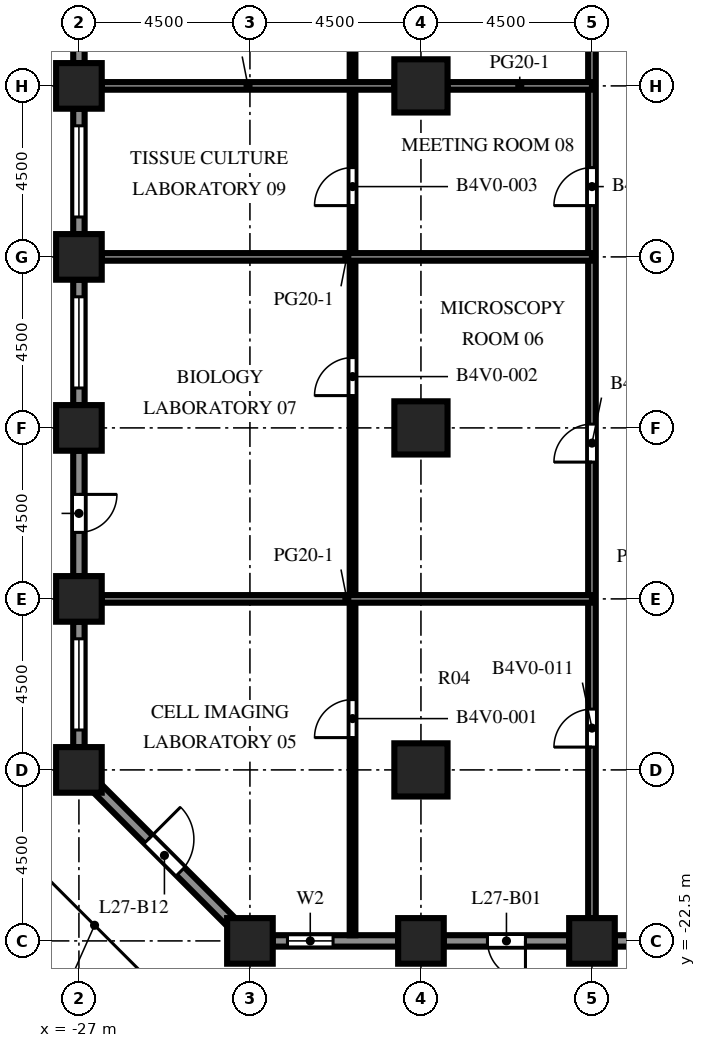
"""IFC4 building model, lengths in metres.
Left out: names, types, materials, properties, quantities, classifications, styles, units other than length and angle.
Written with IfcOpenShell. Run it as: python <this file> out.ifc"""

import sys

from ifc_helpers import new_model, si_unit, direction, frame, frame_2d, origin, origin_2d, place, context, subcontext, project, spatial, rectangle, extrude, element, fill, save


model = new_model("IFC4")
c1 = context("Model", 3, precision=1e-05, world=origin(), true_north=direction((0.0, 1.0)))
c2 = subcontext(c1, "Body", "Model", "MODEL_VIEW")
j1 = project(units=[si_unit("LENGTHUNIT", "METRE"), si_unit("PLANEANGLEUNIT", "RADIAN")], contexts=[c1])
p1 = place(None, origin())
s1 = spatial("IfcSite", under=j1, at=p1, CompositionType="ELEMENT")
p2 = place(p1, origin())
s2 = spatial("IfcBuilding", under=s1, at=p2, CompositionType="ELEMENT")
p3 = place(p2, frame((0.0, 0.0, 120.8)))
s3 = spatial("IfcBuildingStorey", under=s2, at=p3, CompositionType="ELEMENT", Elevation=120.8)
for number, where, z_axis, x_axis in (
    (1, (-27.0, -18.0, 0.0), (0.0, 0.0, 1.0), (1.0, 0.0, 0.0)),
    (2, (-27.0, -13.5, 0.0), (0.0, 0.0, 1.0), (1.0, 0.0, 0.0)),
    (3, (-27.0, -9.0, 0.0), (0.0, 0.0, 1.0), (1.0, 0.0, 0.0)),
    (4, (-27.0, -4.5, 0.0), (0.0, 0.0, 1.0), (1.0, 0.0, 0.0)),
    (5, (-27.0, 0.0, 0.0), (0.0, 0.0, 1.0), (1.0, 0.0, 0.0)),
    (6, (-22.5, -22.5, 0.0), (0.0, 0.0, 1.0), (1.0, 0.0, 0.0)),
    (7, (-18.0, -22.5, 0.0), (0.0, 0.0, 1.0), (1.0, 0.0, 0.0)),
    (8, (-13.5, -22.5, 0.0), (0.0, 0.0, 1.0), (1.0, 0.0, 0.0)),
):
    element("IfcColumn", number, at=place(p3, frame(where, z_axis=z_axis, x_axis=x_axis)), inside=s3, PredefinedType="COLUMN", context=c2, shape_type="SweptSolid", body=[
        extrude(rectangle(XDim=1.2, YDim=1.2, at=origin_2d()), origin(), (0.0, 0.0, 1.0), 4.1),
    ])
for number, where, z_axis, x_axis in (
    (9, (-18.0, -18.0, 0.0), (0.0, 0.0, 1.0), (1.0, 0.0, 0.0)),
    (10, (-18.0, -9.0, 0.0), (0.0, 0.0, 1.0), (1.0, 0.0, 0.0)),
    (11, (-18.0, 0.0, 0.0), (0.0, 0.0, 1.0), (1.0, 0.0, 0.0)),
):
    element("IfcColumn", number, at=place(p3, frame(where, z_axis=z_axis, x_axis=x_axis)), inside=s3, PredefinedType="COLUMN", context=c2, shape_type="SweptSolid", body=[
        extrude(rectangle(XDim=1.4, YDim=1.4, at=origin_2d()), origin(), (0.0, 0.0, 1.0), 4.1),
    ])
p4 = place(p3, frame((-18.6, -22.5, 0.0), z_axis=(0.0, 0.0, 1.0), x_axis=(-1.0, 0.0, 0.0)))
e12 = element("IfcWall", 12, at=p4, inside=s3, PredefinedType="SOLIDWALL", context=c2, shape_type="SweptSolid", body=[
    extrude(rectangle(XDim=3.3, YDim=0.3, at=frame_2d((1.65, 0.0))), origin(), (0.0, 0.0, 1.0), 2.75),
])
p5 = place(p4, frame((1.712, 0.0, 0.8)))
e13 = element("IfcOpeningElement", 13, at=p5, cuts=e12, PredefinedType="OPENING", context=c2, shape_type="SweptSolid", body=[
    extrude(rectangle(XDim=1.2, YDim=1.7, at=frame_2d((0.6, 0.85))), frame((0.0, 0.16, 0.0), z_axis=(0.0, -1.0, 0.0), x_axis=(1.0, 0.0, 0.0)), (0.0, 0.0, 1.0), 0.32),
])
p6 = place(p3, frame((-14.1, -22.5, 0.0), z_axis=(0.0, 0.0, 1.0), x_axis=(-1.0, 0.0, 0.0)))
e14 = element("IfcWall", 14, at=p6, inside=s3, PredefinedType="SOLIDWALL", context=c2, shape_type="SweptSolid", body=[
    extrude(rectangle(XDim=3.3, YDim=0.3, at=frame_2d((1.65, 0.0))), origin(), (0.0, 0.0, 1.0), 2.75),
])
p7 = place(p6, frame((1.15, 0.0, 0.0)))
e15 = element("IfcOpeningElement", 15, at=p7, cuts=e14, PredefinedType="OPENING", context=c2, shape_type="SweptSolid", body=[
    extrude(rectangle(XDim=1.0, YDim=2.2, at=frame_2d((0.5, 1.1))), frame((0.0, 0.16, 0.0), z_axis=(0.0, -1.0, 0.0), x_axis=(1.0, 0.0, 0.0)), (0.0, 0.0, 1.0), 0.32),
])
p8 = place(p3, frame((-9.6, -22.5, 0.0), z_axis=(0.0, 0.0, 1.0), x_axis=(-1.0, 0.0, 0.0)))
e16 = element("IfcWall", 16, at=p8, inside=s3, PredefinedType="SOLIDWALL", context=c2, shape_type="SweptSolid", body=[
    extrude(rectangle(XDim=3.3, YDim=0.3, at=frame_2d((1.65, 0.0))), origin(), (0.0, 0.0, 1.0), 2.75),
])
p9 = place(p8, frame((1.575, 0.0, 0.8)))
e17 = element("IfcOpeningElement", 17, at=p9, cuts=e16, PredefinedType="OPENING", context=c2, shape_type="SweptSolid", body=[
    extrude(rectangle(XDim=1.2, YDim=1.7, at=frame_2d((0.6, 0.85))), frame((0.0, 0.16, 0.0), z_axis=(0.0, -1.0, 0.0), x_axis=(1.0, 0.0, 0.0)), (0.0, 0.0, 1.0), 0.32),
])
p10 = place(p3, frame((-27.0, 0.6, 0.0), z_axis=(0.0, 0.0, 1.0), x_axis=(0.0, 1.0, 0.0)))
e18 = element("IfcWall", 18, at=p10, inside=s3, PredefinedType="SOLIDWALL", context=c2, shape_type="SweptSolid", body=[
    extrude(rectangle(XDim=3.3, YDim=0.3, at=frame_2d((1.65, 0.0))), origin(), (0.0, 0.0, 1.0), 2.75),
])
p11 = place(p10, frame((0.45, 0.0, 0.8)))
e19 = element("IfcOpeningElement", 19, at=p11, cuts=e18, PredefinedType="OPENING", context=c2, shape_type="SweptSolid", body=[
    extrude(rectangle(XDim=2.4, YDim=1.7, at=frame_2d((1.2, 0.85))), frame((0.0, 0.16, 0.0), z_axis=(0.0, -1.0, 0.0), x_axis=(1.0, 0.0, 0.0)), (0.0, 0.0, 1.0), 0.32),
])
p12 = place(p3, frame((-27.0, -3.9, 0.0), z_axis=(0.0, 0.0, 1.0), x_axis=(0.0, 1.0, 0.0)))
e20 = element("IfcWall", 20, at=p12, inside=s3, PredefinedType="SOLIDWALL", context=c2, shape_type="SweptSolid", body=[
    extrude(rectangle(XDim=3.3, YDim=0.3, at=frame_2d((1.65, 0.0))), origin(), (0.0, 0.0, 1.0), 2.75),
])
p13 = place(p12, frame((0.45, 0.0, 0.8)))
e21 = element("IfcOpeningElement", 21, at=p13, cuts=e20, PredefinedType="OPENING", context=c2, shape_type="SweptSolid", body=[
    extrude(rectangle(XDim=2.4, YDim=1.7, at=frame_2d((1.2, 0.85))), frame((0.0, 0.16, 0.0), z_axis=(0.0, -1.0, 0.0), x_axis=(1.0, 0.0, 0.0)), (0.0, 0.0, 1.0), 0.32),
])
p14 = place(p3, frame((-27.0, -8.4, 0.0), z_axis=(0.0, 0.0, 1.0), x_axis=(0.0, 1.0, 0.0)))
e22 = element("IfcWall", 22, at=p14, inside=s3, PredefinedType="SOLIDWALL", context=c2, shape_type="SweptSolid", body=[
    extrude(rectangle(XDim=3.3, YDim=0.3, at=frame_2d((1.65, 0.0))), origin(), (0.0, 0.0, 1.0), 2.75),
])
p15 = place(p14, frame((0.45, 0.0, 0.8)))
e23 = element("IfcOpeningElement", 23, at=p15, cuts=e22, PredefinedType="OPENING", context=c2, shape_type="SweptSolid", body=[
    extrude(rectangle(XDim=2.4, YDim=1.7, at=frame_2d((1.2, 0.85))), frame((0.0, 0.16, 0.0), z_axis=(0.0, -1.0, 0.0), x_axis=(1.0, 0.0, 0.0)), (0.0, 0.0, 1.0), 0.32),
])
p16 = place(p3, frame((-27.0, -12.9, 0.0), z_axis=(0.0, 0.0, 1.0), x_axis=(0.0, 1.0, 0.0)))
e24 = element("IfcWall", 24, at=p16, inside=s3, PredefinedType="SOLIDWALL", context=c2, shape_type="SweptSolid", body=[
    extrude(rectangle(XDim=3.3, YDim=0.3, at=frame_2d((1.65, 0.0))), origin(), (0.0, 0.0, 1.0), 2.75),
])
p17 = place(p16, frame((1.15, 0.0, 0.0)))
e25 = element("IfcOpeningElement", 25, at=p17, cuts=e24, PredefinedType="OPENING", context=c2, shape_type="SweptSolid", body=[
    extrude(rectangle(XDim=1.0, YDim=2.2, at=frame_2d((0.5, 1.1))), frame((0.0, 0.16, 0.0), z_axis=(0.0, -1.0, 0.0), x_axis=(1.0, 0.0, 0.0)), (0.0, 0.0, 1.0), 0.32),
])
p18 = place(p3, frame((-27.0, -17.4, 0.0), z_axis=(0.0, 0.0, 1.0), x_axis=(0.0, 1.0, 0.0)))
e26 = element("IfcWall", 26, at=p18, inside=s3, PredefinedType="SOLIDWALL", context=c2, shape_type="SweptSolid", body=[
    extrude(rectangle(XDim=3.3, YDim=0.3, at=frame_2d((1.65, 0.0))), origin(), (0.0, 0.0, 1.0), 2.75),
])
p19 = place(p18, frame((0.45, 0.0, 0.8)))
e27 = element("IfcOpeningElement", 27, at=p19, cuts=e26, PredefinedType="OPENING", context=c2, shape_type="SweptSolid", body=[
    extrude(rectangle(XDim=2.4, YDim=1.7, at=frame_2d((1.2, 0.85))), frame((0.0, 0.16, 0.0), z_axis=(0.0, -1.0, 0.0), x_axis=(1.0, 0.0, 0.0)), (0.0, 0.0, 1.0), 0.32),
])
p20 = place(p3, frame((-22.994, -22.006, 0.0), z_axis=(0.0, 0.0, 1.0), x_axis=(-0.707106781187, 0.707106781187, 0.0)))
e28 = element("IfcWall", 28, at=p20, inside=s3, PredefinedType="SOLIDWALL", context=c2, shape_type="SweptSolid", body=[
    extrude(rectangle(XDim=4.967, YDim=0.3, at=frame_2d((2.483, 0.0))), origin(), (0.0, 0.0, 1.0), 2.75),
])
p21 = place(p20, frame((1.884, 0.0, 0.0)))
e29 = element("IfcOpeningElement", 29, at=p21, cuts=e28, PredefinedType="OPENING", context=c2, shape_type="SweptSolid", body=[
    extrude(rectangle(XDim=1.2, YDim=2.2, at=frame_2d((0.6, 1.1))), frame((0.0, 0.16, 0.0), z_axis=(0.0, -1.0, 0.0), x_axis=(1.0, 0.0, 0.0)), (0.0, 0.0, 1.0), 0.32),
])
p22 = place(p3, frame((-19.8, -22.35, 0.0), z_axis=(0.0, 0.0, 1.0), x_axis=(0.0, 1.0, 0.0)))
e30 = element("IfcWall", 30, at=p22, inside=s3, PredefinedType="PARTITIONING", context=c2, shape_type="SweptSolid", body=[
    extrude(rectangle(XDim=53.7, YDim=0.15, at=frame_2d((26.85, 0.0))), origin(), (0.0, 0.0, 1.0), 3.65),
])
p23 = place(p22, frame((5.2, 0.0, 0.0)))
e31 = element("IfcOpeningElement", 31, at=p23, cuts=e30, PredefinedType="OPENING", context=c2, shape_type="SweptSolid", body=[
    extrude(rectangle(XDim=1.0, YDim=2.1, at=frame_2d((0.5, 1.05))), frame((0.0, 0.085, 0.0), z_axis=(0.0, -1.0, 0.0), x_axis=(1.0, 0.0, 0.0)), (0.0, 0.0, 1.0), 0.17),
])
p24 = place(p22, frame((14.2, 0.0, 0.0)))
e32 = element("IfcOpeningElement", 32, at=p24, cuts=e30, PredefinedType="OPENING", context=c2, shape_type="SweptSolid", body=[
    extrude(rectangle(XDim=1.0, YDim=2.1, at=frame_2d((0.5, 1.05))), frame((0.0, 0.085, 0.0), z_axis=(0.0, -1.0, 0.0), x_axis=(1.0, 0.0, 0.0)), (0.0, 0.0, 1.0), 0.17),
])
p25 = place(p22, frame((19.2, 0.0, 0.0)))
e33 = element("IfcOpeningElement", 33, at=p25, cuts=e30, PredefinedType="OPENING", context=c2, shape_type="SweptSolid", body=[
    extrude(rectangle(XDim=1.0, YDim=2.1, at=frame_2d((0.5, 1.05))), frame((0.0, 0.085, 0.0), z_axis=(0.0, -1.0, 0.0), x_axis=(1.0, 0.0, 0.0)), (0.0, 0.0, 1.0), 0.17),
])
p26 = place(p22, frame((29.2, 0.0, 0.0)))
e34 = element("IfcOpeningElement", 34, at=p26, cuts=e30, PredefinedType="OPENING", context=c2, shape_type="SweptSolid", body=[
    extrude(rectangle(XDim=1.0, YDim=2.1, at=frame_2d((0.5, 1.05))), frame((0.0, 0.085, 0.0), z_axis=(0.0, -1.0, 0.0), x_axis=(1.0, 0.0, 0.0)), (0.0, 0.0, 1.0), 0.17),
])
p27 = place(p22, frame((38.45, 0.0, 0.0)))
e35 = element("IfcOpeningElement", 35, at=p27, cuts=e30, PredefinedType="OPENING", context=c2, shape_type="SweptSolid", body=[
    extrude(rectangle(XDim=1.0, YDim=2.1, at=frame_2d((0.5, 1.05))), frame((0.0, 0.085, 0.0), z_axis=(0.0, -1.0, 0.0), x_axis=(1.0, 0.0, 0.0)), (0.0, 0.0, 1.0), 0.17),
])
p28 = place(p22, frame((47.45, 0.0, 0.0)))
e36 = element("IfcOpeningElement", 36, at=p28, cuts=e30, PredefinedType="OPENING", context=c2, shape_type="SweptSolid", body=[
    extrude(rectangle(XDim=1.0, YDim=2.1, at=frame_2d((0.5, 1.05))), frame((0.0, 0.085, 0.0), z_axis=(0.0, -1.0, 0.0), x_axis=(1.0, 0.0, 0.0)), (0.0, 0.0, 1.0), 0.17),
])
p29 = place(p3, frame((-13.5, -21.9, 0.0), z_axis=(0.0, 0.0, 1.0), x_axis=(0.0, 1.0, 0.0)))
e37 = element("IfcWall", 37, at=p29, inside=s3, PredefinedType="PARTITIONING", context=c2, shape_type="SweptSolid", body=[
    extrude(rectangle(XDim=52.8, YDim=0.2, at=frame_2d((26.4, 0.0))), origin(), (0.0, 0.0, 1.0), 3.65),
])
p30 = place(p29, frame((4.5, 0.0, 0.0)))
e38 = element("IfcOpeningElement", 38, at=p30, cuts=e37, PredefinedType="OPENING", context=c2, shape_type="SweptSolid", body=[
    extrude(rectangle(XDim=1.0, YDim=2.1, at=frame_2d((0.5, 1.05))), frame((0.0, 0.11, 0.0), z_axis=(0.0, -1.0, 0.0), x_axis=(1.0, 0.0, 0.0)), (0.0, 0.0, 1.0), 0.22),
])
p31 = place(p29, frame((12.0, 0.0, 0.0)))
e39 = element("IfcOpeningElement", 39, at=p31, cuts=e37, PredefinedType="OPENING", context=c2, shape_type="SweptSolid", body=[
    extrude(rectangle(XDim=1.0, YDim=2.1, at=frame_2d((0.5, 1.05))), frame((0.0, 0.11, 0.0), z_axis=(0.0, -1.0, 0.0), x_axis=(1.0, 0.0, 0.0)), (0.0, 0.0, 1.0), 0.22),
])
p32 = place(p29, frame((18.75, 0.0, 0.0)))
e40 = element("IfcOpeningElement", 40, at=p32, cuts=e37, PredefinedType="OPENING", context=c2, shape_type="SweptSolid", body=[
    extrude(rectangle(XDim=1.0, YDim=2.1, at=frame_2d((0.5, 1.05))), frame((0.0, 0.11, 0.0), z_axis=(0.0, -1.0, 0.0), x_axis=(1.0, 0.0, 0.0)), (0.0, 0.0, 1.0), 0.22),
])
p33 = place(p29, frame((29.75, 0.0, 0.0)))
e41 = element("IfcOpeningElement", 41, at=p33, cuts=e37, PredefinedType="OPENING", context=c2, shape_type="SweptSolid", body=[
    extrude(rectangle(XDim=1.0, YDim=2.1, at=frame_2d((0.5, 1.05))), frame((0.0, 0.11, 0.0), z_axis=(0.0, -1.0, 0.0), x_axis=(1.0, 0.0, 0.0)), (0.0, 0.0, 1.0), 0.22),
])
p34 = place(p29, frame((38.0, 0.0, 0.0)))
e42 = element("IfcOpeningElement", 42, at=p34, cuts=e37, PredefinedType="OPENING", context=c2, shape_type="SweptSolid", body=[
    extrude(rectangle(XDim=1.0, YDim=2.1, at=frame_2d((0.5, 1.05))), frame((0.0, 0.11, 0.0), z_axis=(0.0, -1.0, 0.0), x_axis=(1.0, 0.0, 0.0)), (0.0, 0.0, 1.0), 0.22),
])
p35 = place(p29, frame((48.0, 0.0, 0.0)))
e43 = element("IfcOpeningElement", 43, at=p35, cuts=e37, PredefinedType="OPENING", context=c2, shape_type="SweptSolid", body=[
    extrude(rectangle(XDim=1.0, YDim=2.1, at=frame_2d((0.5, 1.05))), frame((0.0, 0.11, 0.0), z_axis=(0.0, -1.0, 0.0), x_axis=(1.0, 0.0, 0.0)), (0.0, 0.0, 1.0), 0.22),
])
for number, where, z_axis, x_axis in (
    (44, (-26.4, -13.5, 0.0), (0.0, 0.0, 1.0), (1.0, 0.0, 0.0)),
    (45, (-26.4, -4.5, 0.0), (0.0, 0.0, 1.0), (1.0, 0.0, 0.0)),
):
    element("IfcWall", number, at=place(p3, frame(where, z_axis=z_axis, x_axis=x_axis)), inside=s3, PredefinedType="PARTITIONING", context=c2, shape_type="SweptSolid", body=[
        extrude(rectangle(XDim=12.9, YDim=0.2, at=frame_2d((6.45, 0.0))), origin(), (0.0, 0.0, 1.0), 3.65),
    ])
p36 = place(p3, frame((-26.4, 0.0, 0.0), z_axis=(0.0, 0.0, 1.0), x_axis=(1.0, 0.0, 0.0)))
e46 = element("IfcWall", 46, at=p36, inside=s3, PredefinedType="PARTITIONING", context=c2, shape_type="SweptSolid", body=[
    extrude(rectangle(XDim=7.7, YDim=0.2, at=frame_2d((3.85, 0.0))), origin(), (0.0, 0.0, 1.0), 3.65),
])
p37 = place(p3, frame((-17.3, 0.0, 0.0), z_axis=(0.0, 0.0, 1.0), x_axis=(1.0, 0.0, 0.0)))
e47 = element("IfcWall", 47, at=p37, inside=s3, PredefinedType="PARTITIONING", context=c2, shape_type="SweptSolid", body=[
    extrude(rectangle(XDim=3.8, YDim=0.2, at=frame_2d((1.9, 0.0))), origin(), (0.0, 0.0, 1.0), 3.65),
])
p38 = place(p5, origin())
e48 = element("IfcWindow", 48, at=p38, inside=s3, PartitioningType="SINGLE_PANEL", PredefinedType="WINDOW", context=c2, shape_type="SweptSolid", body=[
    extrude(rectangle(XDim=1.2, YDim=1.7, at=frame_2d((0.6, 0.85))), frame((0.0, 0.03, 0.0), z_axis=(0.0, -1.0, 0.0), x_axis=(1.0, 0.0, 0.0)), (0.0, 0.0, 1.0), 0.06),
])
fill(e13, e48)
p39 = place(p7, origin())
e49 = element("IfcDoor", 49, at=p39, inside=s3, OperationType="SINGLE_SWING_LEFT", PredefinedType="DOOR", context=c2, shape_type="SweptSolid", body=[
    extrude(rectangle(XDim=1.0, YDim=2.2, at=frame_2d((0.5, 1.1))), frame((0.0, 0.025, 0.0), z_axis=(0.0, -1.0, 0.0), x_axis=(1.0, 0.0, 0.0)), (0.0, 0.0, 1.0), 0.05),
])
fill(e15, e49)
p40 = place(p13, origin())
e50 = element("IfcWindow", 50, at=p40, inside=s3, PartitioningType="SINGLE_PANEL", PredefinedType="WINDOW", context=c2, shape_type="SweptSolid", body=[
    extrude(rectangle(XDim=2.4, YDim=1.7, at=frame_2d((1.2, 0.85))), frame((0.0, 0.03, 0.0), z_axis=(0.0, -1.0, 0.0), x_axis=(1.0, 0.0, 0.0)), (0.0, 0.0, 1.0), 0.06),
])
fill(e21, e50)
p41 = place(p15, origin())
e51 = element("IfcWindow", 51, at=p41, inside=s3, PartitioningType="SINGLE_PANEL", PredefinedType="WINDOW", context=c2, shape_type="SweptSolid", body=[
    extrude(rectangle(XDim=2.4, YDim=1.7, at=frame_2d((1.2, 0.85))), frame((0.0, 0.03, 0.0), z_axis=(0.0, -1.0, 0.0), x_axis=(1.0, 0.0, 0.0)), (0.0, 0.0, 1.0), 0.06),
])
fill(e23, e51)
p42 = place(p17, origin())
e52 = element("IfcDoor", 52, at=p42, inside=s3, OperationType="SINGLE_SWING_RIGHT", PredefinedType="DOOR", context=c2, shape_type="SweptSolid", body=[
    extrude(rectangle(XDim=1.0, YDim=2.2, at=frame_2d((0.5, 1.1))), frame((0.0, 0.025, 0.0), z_axis=(0.0, -1.0, 0.0), x_axis=(1.0, 0.0, 0.0)), (0.0, 0.0, 1.0), 0.05),
])
fill(e25, e52)
p43 = place(p19, origin())
e53 = element("IfcWindow", 53, at=p43, inside=s3, PartitioningType="SINGLE_PANEL", PredefinedType="WINDOW", context=c2, shape_type="SweptSolid", body=[
    extrude(rectangle(XDim=2.4, YDim=1.7, at=frame_2d((1.2, 0.85))), frame((0.0, 0.03, 0.0), z_axis=(0.0, -1.0, 0.0), x_axis=(1.0, 0.0, 0.0)), (0.0, 0.0, 1.0), 0.06),
])
fill(e27, e53)
p44 = place(p21, origin())
e54 = element("IfcDoor", 54, at=p44, inside=s3, OperationType="SINGLE_SWING_RIGHT", PredefinedType="DOOR", context=c2, shape_type="SweptSolid", body=[
    extrude(rectangle(XDim=1.2, YDim=2.2, at=frame_2d((0.6, 1.1))), frame((0.0, 0.025, 0.0), z_axis=(0.0, -1.0, 0.0), x_axis=(1.0, 0.0, 0.0)), (0.0, 0.0, 1.0), 0.05),
])
fill(e29, e54)
p45 = place(p23, origin())
e55 = element("IfcDoor", 55, at=p45, inside=s3, OperationType="SINGLE_SWING_LEFT", PredefinedType="DOOR", context=c2, shape_type="SweptSolid", body=[
    extrude(rectangle(XDim=1.0, YDim=2.1, at=frame_2d((0.5, 1.05))), frame((0.0, 0.025, 0.0), z_axis=(0.0, -1.0, 0.0), x_axis=(1.0, 0.0, 0.0)), (0.0, 0.0, 1.0), 0.05),
])
fill(e31, e55)
p46 = place(p24, origin())
e56 = element("IfcDoor", 56, at=p46, inside=s3, OperationType="SINGLE_SWING_LEFT", PredefinedType="DOOR", context=c2, shape_type="SweptSolid", body=[
    extrude(rectangle(XDim=1.0, YDim=2.1, at=frame_2d((0.5, 1.05))), frame((0.0, 0.025, 0.0), z_axis=(0.0, -1.0, 0.0), x_axis=(1.0, 0.0, 0.0)), (0.0, 0.0, 1.0), 0.05),
])
fill(e32, e56)
p47 = place(p25, origin())
e57 = element("IfcDoor", 57, at=p47, inside=s3, OperationType="SINGLE_SWING_LEFT", PredefinedType="DOOR", context=c2, shape_type="SweptSolid", body=[
    extrude(rectangle(XDim=1.0, YDim=2.1, at=frame_2d((0.5, 1.05))), frame((0.0, 0.025, 0.0), z_axis=(0.0, -1.0, 0.0), x_axis=(1.0, 0.0, 0.0)), (0.0, 0.0, 1.0), 0.05),
])
fill(e33, e57)
p48 = place(p30, origin())
e58 = element("IfcDoor", 58, at=p48, inside=s3, OperationType="SINGLE_SWING_LEFT", PredefinedType="DOOR", context=c2, shape_type="SweptSolid", body=[
    extrude(rectangle(XDim=1.0, YDim=2.1, at=frame_2d((0.5, 1.05))), frame((0.0, 0.025, 0.0), z_axis=(0.0, -1.0, 0.0), x_axis=(1.0, 0.0, 0.0)), (0.0, 0.0, 1.0), 0.05),
])
fill(e38, e58)
p49 = place(p31, origin())
e59 = element("IfcDoor", 59, at=p49, inside=s3, OperationType="SINGLE_SWING_LEFT", PredefinedType="DOOR", context=c2, shape_type="SweptSolid", body=[
    extrude(rectangle(XDim=1.0, YDim=2.1, at=frame_2d((0.5, 1.05))), frame((0.0, 0.025, 0.0), z_axis=(0.0, -1.0, 0.0), x_axis=(1.0, 0.0, 0.0)), (0.0, 0.0, 1.0), 0.05),
])
fill(e39, e59)
p50 = place(p32, origin())
e60 = element("IfcDoor", 60, at=p50, inside=s3, OperationType="SINGLE_SWING_LEFT", PredefinedType="DOOR", context=c2, shape_type="SweptSolid", body=[
    extrude(rectangle(XDim=1.0, YDim=2.1, at=frame_2d((0.5, 1.05))), frame((0.0, 0.025, 0.0), z_axis=(0.0, -1.0, 0.0), x_axis=(1.0, 0.0, 0.0)), (0.0, 0.0, 1.0), 0.05),
])
fill(e40, e60)
save(model, sys.argv[1])
